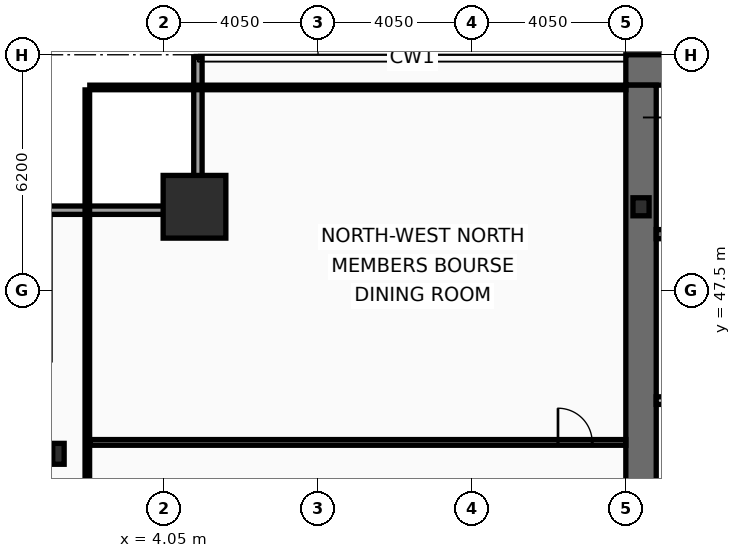
"""IFC4 building model, lengths in metres.
Left out: names, types, materials, properties, quantities, classifications, styles, units other than length and angle.
Written with IfcOpenShell. Run it as: python <this file> out.ifc"""

import sys

from ifc_helpers import new_model, si_unit, direction, frame, frame_2d, origin, origin_2d, place, context, subcontext, project, spatial, rectangle, hollow_rectangle, i_section, extrude, element, fill, save


model = new_model("IFC4")
c1 = context("Model", 3, precision=1e-05, world=origin(), true_north=direction((0.0, 1.0)))
c2 = subcontext(c1, "Body", "Model", "MODEL_VIEW")
j1 = project(units=[si_unit("LENGTHUNIT", "METRE"), si_unit("PLANEANGLEUNIT", "RADIAN")], contexts=[c1])
p1 = place(None, origin())
s1 = spatial("IfcSite", under=j1, at=p1, CompositionType="ELEMENT")
p2 = place(p1, origin())
s2 = spatial("IfcBuilding", under=s1, at=p2, CompositionType="ELEMENT")
p3 = place(p2, frame((0.0, 0.0, 45.8)))
s3 = spatial("IfcBuildingStorey", under=s2, at=p3, CompositionType="ELEMENT", Elevation=45.8)
p4 = place(p3, frame((16.2, 53.3, 0.0), z_axis=(0.0, 0.0, 1.0), x_axis=(1.0, 0.0, 0.0)))
e1 = element("IfcWall", 1, at=p4, inside=s3, PredefinedType="SHEAR", context=c2, shape_type="SweptSolid", body=[
    extrude(rectangle(XDim=40.5, YDim=0.8, at=frame_2d((20.25, 0.0))), origin(), (0.0, 0.0, 1.0), 3.82),
])
p5 = place(p3, frame((16.6, 42.1, 0.0), z_axis=(0.0, 0.0, 1.0), x_axis=(0.0, 1.0, 0.0)))
e2 = element("IfcWall", 2, at=p5, inside=s3, PredefinedType="SHEAR", context=c2, shape_type="SweptSolid", body=[
    extrude(rectangle(XDim=10.8, YDim=0.8, at=frame_2d((5.4, 0.0))), origin(), (0.0, 0.0, 1.0), 3.82),
])
p6 = place(p3, frame((17.0, 48.98, 0.0), z_axis=(0.0, 0.0, 1.0), x_axis=(1.0, 0.0, 0.0)))
e3 = element("IfcWall", 3, at=p6, inside=s3, PredefinedType="SHEAR", context=c2, shape_type="SweptSolid", body=[
    extrude(rectangle(XDim=7.22, YDim=0.24, at=frame_2d((3.61, 0.0))), origin(), (0.0, 0.0, 1.0), 3.82),
])
p7 = place(p6, frame((0.22, 0.0, 0.0)))
e4 = element("IfcOpeningElement", 4, at=p7, cuts=e3, PredefinedType="OPENING", context=c2, shape_type="SweptSolid", body=[
    extrude(rectangle(XDim=1.05, YDim=2.15, at=frame_2d((0.525, 1.075))), frame((0.0, 0.13, 0.0), z_axis=(0.0, -1.0, 0.0), x_axis=(1.0, 0.0, 0.0)), (0.0, 0.0, 1.0), 0.26),
])
p8 = place(p3, frame((4.85, 49.7, 0.0), z_axis=(0.0, 0.0, 1.0), x_axis=(1.0, 0.0, 0.0)))
e5 = element("IfcColumn", 5, at=p8, inside=s3, PredefinedType="COLUMN", context=c2, shape_type="SweptSolid", body=[
    extrude(hollow_rectangle(XDim=1.65, YDim=1.65, WallThickness=0.075, at=origin_2d()), origin(), (0.0, 0.0, 1.0), 4.0),
])
p9 = place(p3, frame((1.27, 43.2, 0.0), z_axis=(0.0, 0.0, 1.0), x_axis=(1.0, 0.0, 0.0)))
e6 = element("IfcColumn", 6, at=p9, inside=s3, PredefinedType="COLUMN", context=c2, shape_type="SweptSolid", body=[
    extrude(i_section(OverallWidth=0.3, OverallDepth=0.55, WebThickness=0.015, FlangeThickness=0.029, at=origin_2d()), origin(), (0.0, 0.0, 1.0), 4.0),
])
p10 = place(p3, frame((16.6, 49.7, 0.0), z_axis=(0.0, 0.0, 1.0), x_axis=(1.0, 0.0, 0.0)))
e7 = element("IfcColumn", 7, at=p10, inside=s3, PredefinedType="COLUMN", context=c2, shape_type="SweptSolid", body=[
    extrude(i_section(OverallWidth=0.424, OverallDepth=0.474, WebThickness=0.048, FlangeThickness=0.077, at=origin_2d()), origin(), (0.0, 0.0, 1.0), 4.0),
])
p11 = place(p3, frame((0.83, 49.61, 0.0), z_axis=(0.0, 0.0, 1.0), x_axis=(1.0, 0.0, 0.0)))
e8 = element("IfcWall", 8, at=p11, inside=s3, PredefinedType="SOLIDWALL", context=c2, shape_type="SweptSolid", body=[
    extrude(rectangle(XDim=4.22, YDim=0.22, at=frame_2d((2.11, 0.0))), origin(), (0.0, 0.0, 1.0), 3.16),
])
p12 = place(p3, frame((4.94, 49.72, 0.0), z_axis=(0.0, 0.0, 1.0), x_axis=(0.0, 1.0, 0.0)))
e9 = element("IfcWall", 9, at=p12, inside=s3, PredefinedType="SOLIDWALL", context=c2, shape_type="SweptSolid", body=[
    extrude(rectangle(XDim=3.91, YDim=0.22, at=frame_2d((1.955, 0.0))), origin(), (0.0, 0.0, 1.0), 3.16),
])
p13 = place(p3, frame((17.0, 44.6, 0.0), z_axis=(0.0, 0.0, 1.0), x_axis=(1.0, 0.0, 0.0)))
e10 = element("IfcWall", 10, at=p13, inside=s3, PredefinedType="PARTITIONING", context=c2, shape_type="SweptSolid", body=[
    extrude(rectangle(XDim=4.0, YDim=0.2, at=frame_2d((2.0, 0.0))), origin(), (0.0, 0.0, 1.0), 3.82),
])
p14 = place(p13, frame((1.25, 0.0, 0.0)))
e11 = element("IfcOpeningElement", 11, at=p14, cuts=e10, PredefinedType="OPENING", context=c2, shape_type="SweptSolid", body=[
    extrude(rectangle(XDim=1.05, YDim=2.15, at=frame_2d((0.525, 1.075))), frame((0.0, 0.11, 0.0), z_axis=(0.0, -1.0, 0.0), x_axis=(1.0, 0.0, 0.0)), (0.0, 0.0, 1.0), 0.22),
])
p15 = place(p3, frame((2.095, 43.5, 0.0), z_axis=(0.0, 0.0, 1.0), x_axis=(1.0, 0.0, 0.0)))
e12 = element("IfcWall", 12, at=p15, inside=s3, PredefinedType="PARTITIONING", context=c2, shape_type="SweptSolid", body=[
    extrude(rectangle(XDim=14.105, YDim=0.15, at=frame_2d((7.052, 0.0))), origin(), (0.0, 0.0, 1.0), 3.01),
])
p16 = place(p15, frame((12.32, 0.0, 0.0)))
e13 = element("IfcOpeningElement", 13, at=p16, cuts=e12, PredefinedType="OPENING", context=c2, shape_type="SweptSolid", body=[
    extrude(rectangle(XDim=0.9, YDim=2.05, at=frame_2d((0.45, 1.025))), frame((0.0, 0.085, 0.0), z_axis=(0.0, -1.0, 0.0), x_axis=(1.0, 0.0, 0.0)), (0.0, 0.0, 1.0), 0.17),
])
p17 = place(p3, frame((2.03, 10.665, 0.0), z_axis=(0.0, 0.0, 1.0), x_axis=(0.0, 1.0, 0.0)))
e14 = element("IfcWall", 14, at=p17, inside=s3, PredefinedType="PARTITIONING", context=c2, shape_type="SweptSolid", body=[
    extrude(rectangle(XDim=42.11, YDim=0.12, at=frame_2d((21.055, 0.0))), origin(), (0.0, 0.0, 1.0), 3.01),
])
p18 = place(p3, frame((2.095, 52.84, 0.0), z_axis=(0.0, 0.0, 1.0), x_axis=(1.0, 0.0, 0.0)))
e15 = element("IfcWall", 15, at=p18, inside=s3, PredefinedType="PARTITIONING", context=c2, shape_type="SweptSolid", body=[
    extrude(rectangle(XDim=14.105, YDim=0.12, at=frame_2d((7.052, 0.0))), origin(), (0.0, 0.0, 1.0), 3.82),
])
p19 = place(p16, origin())
e16 = element("IfcDoor", 16, at=p19, inside=s3, OperationType="SINGLE_SWING_LEFT", PredefinedType="DOOR", context=c2, shape_type="SweptSolid", body=[
    extrude(rectangle(XDim=0.9, YDim=2.05, at=frame_2d((0.45, 1.025))), frame((0.0, 0.025, 0.0), z_axis=(0.0, -1.0, 0.0), x_axis=(1.0, 0.0, 0.0)), (0.0, 0.0, 1.0), 0.05),
])
fill(e13, e16)
save(model, sys.argv[1])
